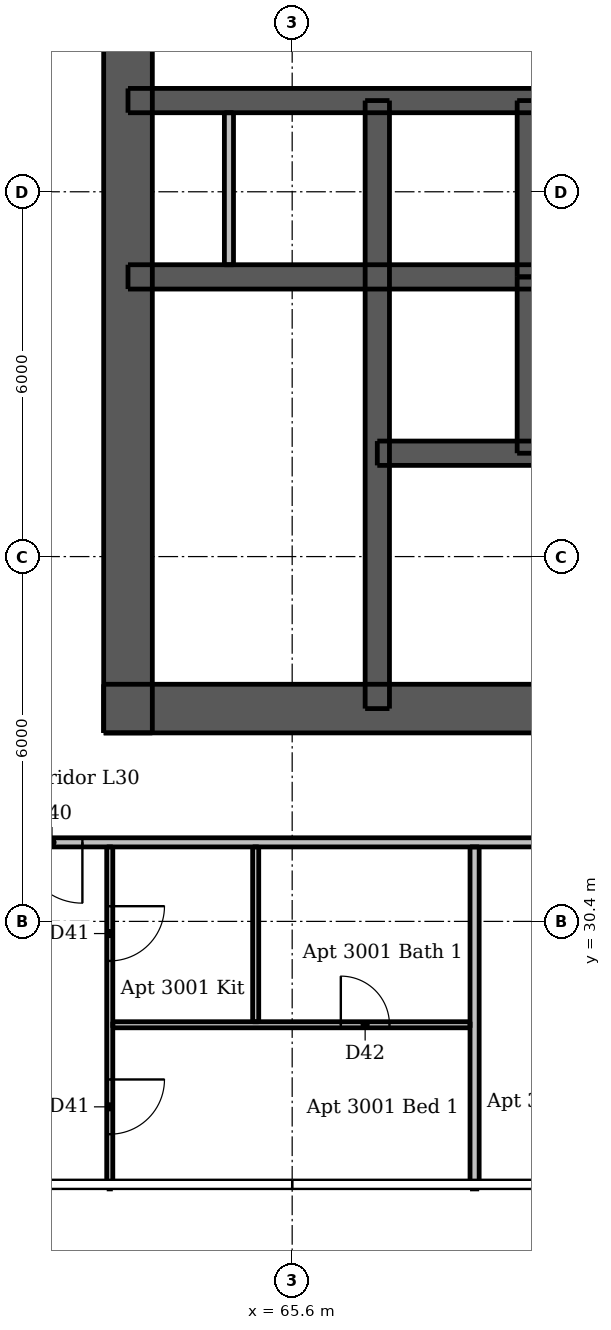
"""IFC4 building model, lengths in metres.
Left out: names, types, materials, properties, quantities, classifications, styles, units other than length and angle.
Written with IfcOpenShell. Run it as: python <this file> out.ifc"""

import sys

from ifc_helpers import new_model, si_unit, direction, frame, frame_2d, origin, place, context, subcontext, project, spatial, rectangle, extrude, element, fill, save


model = new_model("IFC4")
c1 = context("Model", 3, precision=1e-05, world=origin(), true_north=direction((0.0, 1.0)))
c2 = subcontext(c1, "Body", "Model", "MODEL_VIEW")
j1 = project(units=[si_unit("LENGTHUNIT", "METRE"), si_unit("PLANEANGLEUNIT", "RADIAN")], contexts=[c1])
p1 = place(None, origin())
s1 = spatial("IfcSite", under=j1, at=p1, CompositionType="ELEMENT")
p2 = place(p1, origin())
s2 = spatial("IfcBuilding", under=s1, at=p2, CompositionType="ELEMENT")
p3 = place(p2, frame((0.0, 0.0, 111.7)))
s3 = spatial("IfcBuildingStorey", under=s2, at=p3, CompositionType="ELEMENT", Elevation=111.7)
p4 = place(p3, frame((62.5, 33.9, 0.0), z_axis=(0.0, 0.0, 1.0), x_axis=(1.0, 0.0, 0.0)))
e1 = element("IfcWall", 1, at=p4, inside=s3, PredefinedType="SHEAR", context=c2, shape_type="SweptSolid", body=[
    extrude(rectangle(XDim=24.0, YDim=0.8, at=frame_2d((12.0, 0.0))), origin(), (0.0, 0.0, 1.0), 3.05),
])
p5 = place(p4, frame((2.0, 0.0, 0.0)))
e2 = element("IfcOpeningElement", 2, at=p5, cuts=e1, PredefinedType="OPENING", context=c2, shape_type="SweptSolid", body=[
    extrude(rectangle(XDim=1.1, YDim=2.1, at=frame_2d((0.55, 1.05))), frame((0.0, 0.41, 0.0), z_axis=(0.0, -1.0, 0.0), x_axis=(1.0, 0.0, 0.0)), (0.0, 0.0, 1.0), 0.82),
])
p6 = place(p4, frame((20.9, 0.0, 0.0)))
e3 = element("IfcOpeningElement", 3, at=p6, cuts=e1, PredefinedType="OPENING", context=c2, shape_type="SweptSolid", body=[
    extrude(rectangle(XDim=1.1, YDim=2.1, at=frame_2d((0.55, 1.05))), frame((0.0, 0.41, 0.0), z_axis=(0.0, -1.0, 0.0), x_axis=(1.0, 0.0, 0.0)), (0.0, 0.0, 1.0), 0.82),
])
p7 = place(p4, frame((8.0, 0.0, 0.0)))
e4 = element("IfcOpeningElement", 4, at=p7, cuts=e1, PredefinedType="OPENING", context=c2, shape_type="SweptSolid", body=[
    extrude(rectangle(XDim=1.1, YDim=2.1, at=frame_2d((0.55, 1.05))), frame((0.0, 0.41, 0.0), z_axis=(0.0, -1.0, 0.0), x_axis=(1.0, 0.0, 0.0)), (0.0, 0.0, 1.0), 0.82),
])
p8 = place(p4, frame((16.363, 0.0, 0.0)))
e5 = element("IfcOpeningElement", 5, at=p8, cuts=e1, PredefinedType="OPENING", context=c2, shape_type="SweptSolid", body=[
    extrude(rectangle(XDim=0.9, YDim=2.1, at=frame_2d((0.45, 1.05))), frame((0.0, 0.41, 0.0), z_axis=(0.0, -1.0, 0.0), x_axis=(1.0, 0.0, 0.0)), (0.0, 0.0, 1.0), 0.82),
])
p9 = place(p3, frame((62.9, 33.5, 0.0), z_axis=(0.0, 0.0, 1.0), x_axis=(0.0, 1.0, 0.0)))
e6 = element("IfcWall", 6, at=p9, inside=s3, PredefinedType="SHEAR", context=c2, shape_type="SweptSolid", body=[
    extrude(rectangle(XDim=24.0, YDim=0.8, at=frame_2d((12.0, 0.0))), origin(), (0.0, 0.0, 1.0), 3.05),
])
p10 = place(p9, frame((11.2, 0.0, 0.0)))
e7 = element("IfcOpeningElement", 7, at=p10, cuts=e6, PredefinedType="OPENING", context=c2, shape_type="SweptSolid", body=[
    extrude(rectangle(XDim=1.6, YDim=2.1, at=frame_2d((0.8, 1.05))), frame((0.0, 0.41, 0.0), z_axis=(0.0, -1.0, 0.0), x_axis=(1.0, 0.0, 0.0)), (0.0, 0.0, 1.0), 0.82),
])
p11 = place(p3, frame((62.9, 41.0, 0.0), z_axis=(0.0, 0.0, 1.0), x_axis=(1.0, 0.0, 0.0)))
e8 = element("IfcWall", 8, at=p11, inside=s3, PredefinedType="SHEAR", context=c2, shape_type="SweptSolid", body=[
    extrude(rectangle(XDim=23.2, YDim=0.4, at=frame_2d((11.6, 0.0))), origin(), (0.0, 0.0, 1.0), 3.05),
])
p12 = place(p3, frame((62.9, 43.9, 0.0), z_axis=(0.0, 0.0, 1.0), x_axis=(1.0, 0.0, 0.0)))
e9 = element("IfcWall", 9, at=p12, inside=s3, PredefinedType="SHEAR", context=c2, shape_type="SweptSolid", body=[
    extrude(rectangle(XDim=23.2, YDim=0.4, at=frame_2d((11.6, 0.0))), origin(), (0.0, 0.0, 1.0), 3.05),
])
p13 = place(p12, frame((0.63, 0.0, 0.0)))
e10 = element("IfcOpeningElement", 10, at=p13, cuts=e9, PredefinedType="OPENING", context=c2, shape_type="SweptSolid", body=[
    extrude(rectangle(XDim=0.8, YDim=2.1, at=frame_2d((0.4, 1.05))), frame((0.0, 0.21, 0.0), z_axis=(0.0, -1.0, 0.0), x_axis=(1.0, 0.0, 0.0)), (0.0, 0.0, 1.0), 0.42),
])
p14 = place(p12, frame((2.33, 0.0, 0.0)))
e11 = element("IfcOpeningElement", 11, at=p14, cuts=e9, PredefinedType="OPENING", context=c2, shape_type="SweptSolid", body=[
    extrude(rectangle(XDim=0.9, YDim=2.1, at=frame_2d((0.45, 1.05))), frame((0.0, 0.21, 0.0), z_axis=(0.0, -1.0, 0.0), x_axis=(1.0, 0.0, 0.0)), (0.0, 0.0, 1.0), 0.42),
])
p15 = place(p12, frame((20.6, 0.0, 0.0)))
e12 = element("IfcOpeningElement", 12, at=p15, cuts=e9, PredefinedType="OPENING", context=c2, shape_type="SweptSolid", body=[
    extrude(rectangle(XDim=0.9, YDim=2.1, at=frame_2d((0.45, 1.05))), frame((0.0, 0.21, 0.0), z_axis=(0.0, -1.0, 0.0), x_axis=(1.0, 0.0, 0.0)), (0.0, 0.0, 1.0), 0.42),
])
p16 = place(p12, frame((4.8, 0.0, 0.0)))
e13 = element("IfcOpeningElement", 13, at=p16, cuts=e9, PredefinedType="OPENING", context=c2, shape_type="SweptSolid", body=[
    extrude(rectangle(XDim=1.1, YDim=2.1, at=frame_2d((0.55, 1.05))), frame((0.0, 0.21, 0.0), z_axis=(0.0, -1.0, 0.0), x_axis=(1.0, 0.0, 0.0)), (0.0, 0.0, 1.0), 0.42),
])
p17 = place(p12, frame((7.3, 0.0, 0.0)))
e14 = element("IfcOpeningElement", 14, at=p17, cuts=e9, PredefinedType="OPENING", context=c2, shape_type="SweptSolid", body=[
    extrude(rectangle(XDim=1.1, YDim=2.1, at=frame_2d((0.55, 1.05))), frame((0.0, 0.21, 0.0), z_axis=(0.0, -1.0, 0.0), x_axis=(1.0, 0.0, 0.0)), (0.0, 0.0, 1.0), 0.42),
])
p18 = place(p12, frame((9.8, 0.0, 0.0)))
e15 = element("IfcOpeningElement", 15, at=p18, cuts=e9, PredefinedType="OPENING", context=c2, shape_type="SweptSolid", body=[
    extrude(rectangle(XDim=1.1, YDim=2.1, at=frame_2d((0.55, 1.05))), frame((0.0, 0.21, 0.0), z_axis=(0.0, -1.0, 0.0), x_axis=(1.0, 0.0, 0.0)), (0.0, 0.0, 1.0), 0.42),
])
p19 = place(p12, frame((12.3, 0.0, 0.0)))
e16 = element("IfcOpeningElement", 16, at=p19, cuts=e9, PredefinedType="OPENING", context=c2, shape_type="SweptSolid", body=[
    extrude(rectangle(XDim=1.1, YDim=2.1, at=frame_2d((0.55, 1.05))), frame((0.0, 0.21, 0.0), z_axis=(0.0, -1.0, 0.0), x_axis=(1.0, 0.0, 0.0)), (0.0, 0.0, 1.0), 0.42),
])
p20 = place(p12, frame((14.8, 0.0, 0.0)))
e17 = element("IfcOpeningElement", 17, at=p20, cuts=e9, PredefinedType="OPENING", context=c2, shape_type="SweptSolid", body=[
    extrude(rectangle(XDim=1.1, YDim=2.1, at=frame_2d((0.55, 1.05))), frame((0.0, 0.21, 0.0), z_axis=(0.0, -1.0, 0.0), x_axis=(1.0, 0.0, 0.0)), (0.0, 0.0, 1.0), 0.42),
])
p21 = place(p12, frame((17.3, 0.0, 0.0)))
e18 = element("IfcOpeningElement", 18, at=p21, cuts=e9, PredefinedType="OPENING", context=c2, shape_type="SweptSolid", body=[
    extrude(rectangle(XDim=1.1, YDim=2.1, at=frame_2d((0.55, 1.05))), frame((0.0, 0.21, 0.0), z_axis=(0.0, -1.0, 0.0), x_axis=(1.0, 0.0, 0.0)), (0.0, 0.0, 1.0), 0.42),
])
p22 = place(p3, frame((67.0, 33.9, 0.0), z_axis=(0.0, 0.0, 1.0), x_axis=(0.0, 1.0, 0.0)))
e19 = element("IfcWall", 19, at=p22, inside=s3, PredefinedType="SHEAR", context=c2, shape_type="SweptSolid", body=[
    extrude(rectangle(XDim=10.0, YDim=0.4, at=frame_2d((5.0, 0.0))), origin(), (0.0, 0.0, 1.0), 3.05),
])
p23 = place(p22, frame((0.6, 0.0, 0.0)))
e20 = element("IfcOpeningElement", 20, at=p23, cuts=e19, PredefinedType="OPENING", context=c2, shape_type="SweptSolid", body=[
    extrude(rectangle(XDim=1.1, YDim=2.1, at=frame_2d((0.55, 1.05))), frame((0.0, 0.21, 0.0), z_axis=(0.0, -1.0, 0.0), x_axis=(1.0, 0.0, 0.0)), (0.0, 0.0, 1.0), 0.42),
])
p24 = place(p3, frame((69.5, 41.0, 0.0), z_axis=(0.0, 0.0, 1.0), x_axis=(0.0, 1.0, 0.0)))
e21 = element("IfcWall", 21, at=p24, inside=s3, PredefinedType="SHEAR", context=c2, shape_type="SweptSolid", body=[
    extrude(rectangle(XDim=2.9, YDim=0.4, at=frame_2d((1.45, 0.0))), origin(), (0.0, 0.0, 1.0), 3.05),
])
p25 = place(p3, frame((67.0, 38.1, 0.0), z_axis=(0.0, 0.0, 1.0), x_axis=(1.0, 0.0, 0.0)))
e22 = element("IfcWall", 22, at=p25, inside=s3, PredefinedType="SHEAR", context=c2, shape_type="SweptSolid", body=[
    extrude(rectangle(XDim=7.5, YDim=0.4, at=frame_2d((3.75, 0.0))), origin(), (0.0, 0.0, 1.0), 3.05),
])
p26 = place(p25, frame((0.7, 0.0, 0.0)))
e23 = element("IfcOpeningElement", 23, at=p26, cuts=e22, PredefinedType="OPENING", context=c2, shape_type="SweptSolid", body=[
    extrude(rectangle(XDim=1.1, YDim=2.1, at=frame_2d((0.55, 1.05))), frame((0.0, 0.21, 0.0), z_axis=(0.0, -1.0, 0.0), x_axis=(1.0, 0.0, 0.0)), (0.0, 0.0, 1.0), 0.42),
])
p27 = place(p25, frame((3.2, 0.0, 0.0)))
e24 = element("IfcOpeningElement", 24, at=p27, cuts=e22, PredefinedType="OPENING", context=c2, shape_type="SweptSolid", body=[
    extrude(rectangle(XDim=1.1, YDim=2.1, at=frame_2d((0.55, 1.05))), frame((0.0, 0.21, 0.0), z_axis=(0.0, -1.0, 0.0), x_axis=(1.0, 0.0, 0.0)), (0.0, 0.0, 1.0), 0.42),
])
p28 = place(p25, frame((5.65, 0.0, 0.0)))
e25 = element("IfcOpeningElement", 25, at=p28, cuts=e22, PredefinedType="OPENING", context=c2, shape_type="SweptSolid", body=[
    extrude(rectangle(XDim=1.2, YDim=2.1, at=frame_2d((0.6, 1.05))), frame((0.0, 0.21, 0.0), z_axis=(0.0, -1.0, 0.0), x_axis=(1.0, 0.0, 0.0)), (0.0, 0.0, 1.0), 0.42),
])
p29 = place(p3, frame((69.5, 38.1, 0.0), z_axis=(0.0, 0.0, 1.0), x_axis=(0.0, 1.0, 0.0)))
e26 = element("IfcWall", 26, at=p29, inside=s3, PredefinedType="SHEAR", context=c2, shape_type="SweptSolid", body=[
    extrude(rectangle(XDim=2.9, YDim=0.4, at=frame_2d((1.45, 0.0))), origin(), (0.0, 0.0, 1.0), 3.05),
])
p30 = place(p3, frame((64.56, 41.2, 0.0), z_axis=(0.0, 0.0, 1.0), x_axis=(0.0, 1.0, 0.0)))
e27 = element("IfcWall", 27, at=p30, inside=s3, PredefinedType="PLUMBINGWALL", context=c2, shape_type="SweptSolid", body=[
    extrude(rectangle(XDim=2.5, YDim=0.15, at=frame_2d((1.25, 0.0))), origin(), (0.0, 0.0, 1.0), 3.05),
])
p31 = place(p3, frame((62.6, 31.625, 0.0), z_axis=(0.0, 0.0, 1.0), x_axis=(0.0, -1.0, 0.0)))
e28 = element("IfcWall", 28, at=p31, inside=s3, PredefinedType="PARTITIONING", context=c2, shape_type="SweptSolid", body=[
    extrude(rectangle(XDim=5.625, YDim=0.1, at=frame_2d((2.812, 0.0))), origin(), (0.0, 0.0, 1.0), 3.05),
])
p32 = place(p31, frame((0.975, 0.0, 0.0)))
e29 = element("IfcOpeningElement", 29, at=p32, cuts=e28, PredefinedType="OPENING", context=c2, shape_type="SweptSolid", body=[
    extrude(rectangle(XDim=0.9, YDim=2.1, at=frame_2d((0.45, 1.05))), frame((0.0, 0.06, 0.0), z_axis=(0.0, -1.0, 0.0), x_axis=(1.0, 0.0, 0.0)), (0.0, 0.0, 1.0), 0.12),
])
p33 = place(p31, frame((3.825, 0.0, 0.0)))
e30 = element("IfcOpeningElement", 30, at=p33, cuts=e28, PredefinedType="OPENING", context=c2, shape_type="SweptSolid", body=[
    extrude(rectangle(XDim=0.9, YDim=2.1, at=frame_2d((0.45, 1.05))), frame((0.0, 0.06, 0.0), z_axis=(0.0, -1.0, 0.0), x_axis=(1.0, 0.0, 0.0)), (0.0, 0.0, 1.0), 0.12),
])
p34 = place(p3, frame((65.0, 28.75, 0.0), z_axis=(0.0, 0.0, 1.0), x_axis=(0.0, 1.0, 0.0)))
e31 = element("IfcWall", 31, at=p34, inside=s3, PredefinedType="PARTITIONING", context=c2, shape_type="SweptSolid", body=[
    extrude(rectangle(XDim=2.875, YDim=0.1, at=frame_2d((1.438, 0.0))), origin(), (0.0, 0.0, 1.0), 3.05),
])
p35 = place(p3, frame((62.65, 28.7, 0.0), z_axis=(0.0, 0.0, 1.0), x_axis=(1.0, 0.0, 0.0)))
e32 = element("IfcWall", 32, at=p35, inside=s3, PredefinedType="PARTITIONING", context=c2, shape_type="SweptSolid", body=[
    extrude(rectangle(XDim=5.875, YDim=0.1, at=frame_2d((2.938, 0.0))), origin(), (0.0, 0.0, 1.0), 3.05),
])
p36 = place(p35, frame((3.75, 0.0, 0.0)))
e33 = element("IfcOpeningElement", 33, at=p36, cuts=e32, PredefinedType="OPENING", context=c2, shape_type="SweptSolid", body=[
    extrude(rectangle(XDim=0.8, YDim=2.1, at=frame_2d((0.4, 1.05))), frame((0.0, 0.06, 0.0), z_axis=(0.0, -1.0, 0.0), x_axis=(1.0, 0.0, 0.0)), (0.0, 0.0, 1.0), 0.12),
])
p37 = place(p3, frame((68.6, 26.0, 0.0), z_axis=(0.0, 0.0, 1.0), x_axis=(0.0, 1.0, 0.0)))
e34 = element("IfcWall", 34, at=p37, inside=s3, PredefinedType="PARTITIONING", context=c2, shape_type="SweptSolid", body=[
    extrude(rectangle(XDim=5.625, YDim=0.15, at=frame_2d((2.812, 0.0))), origin(), (0.0, 0.0, 1.0), 3.05),
])
p38 = place(p3, frame((89.525, 31.7, 0.0), z_axis=(0.0, 0.0, 1.0), x_axis=(-1.0, 0.0, 0.0)))
e35 = element("IfcWall", 35, at=p38, inside=s3, PredefinedType="PARTITIONING", context=c2, shape_type="SweptSolid", body=[
    extrude(rectangle(XDim=28.75, YDim=0.15, at=frame_2d((14.375, 0.0))), origin(), (0.0, 0.0, 1.0), 3.05),
])
p39 = place(p38, frame((27.375, 0.0, 0.0)))
e36 = element("IfcOpeningElement", 36, at=p39, cuts=e35, PredefinedType="OPENING", context=c2, shape_type="SweptSolid", body=[
    extrude(rectangle(XDim=1.0, YDim=2.1, at=frame_2d((0.5, 1.05))), frame((0.0, 0.085, 0.0), z_axis=(0.0, -1.0, 0.0), x_axis=(1.0, 0.0, 0.0)), (0.0, 0.0, 1.0), 0.17),
])
p40 = place(p38, frame((12.625, 0.0, 0.0)))
e37 = element("IfcOpeningElement", 37, at=p40, cuts=e35, PredefinedType="OPENING", context=c2, shape_type="SweptSolid", body=[
    extrude(rectangle(XDim=1.0, YDim=2.1, at=frame_2d((0.5, 1.05))), frame((0.0, 0.085, 0.0), z_axis=(0.0, -1.0, 0.0), x_axis=(1.0, 0.0, 0.0)), (0.0, 0.0, 1.0), 0.17),
])
p41 = place(p38, frame((2.425, 0.0, 0.0)))
e38 = element("IfcOpeningElement", 38, at=p41, cuts=e35, PredefinedType="OPENING", context=c2, shape_type="SweptSolid", body=[
    extrude(rectangle(XDim=1.0, YDim=2.1, at=frame_2d((0.5, 1.05))), frame((0.0, 0.085, 0.0), z_axis=(0.0, -1.0, 0.0), x_axis=(1.0, 0.0, 0.0)), (0.0, 0.0, 1.0), 0.17),
])
p42 = place(p5, origin())
e39 = element("IfcDoor", 39, at=p42, inside=s3, OperationType="SINGLE_SWING_LEFT", PredefinedType="DOOR", context=c2, shape_type="SweptSolid", body=[
    extrude(rectangle(XDim=1.1, YDim=2.1, at=frame_2d((0.55, 1.05))), frame((0.0, 0.388, 0.0), z_axis=(0.0, -1.0, 0.0), x_axis=(1.0, 0.0, 0.0)), (0.0, 0.0, 1.0), 0.05),
])
fill(e2, e39)
p43 = place(p23, origin())
e40 = element("IfcDoor", 40, at=p43, inside=s3, OperationType="SINGLE_SWING_RIGHT", PredefinedType="DOOR", context=c2, shape_type="SweptSolid", body=[
    extrude(rectangle(XDim=1.1, YDim=2.1, at=frame_2d((0.55, 1.05))), frame((0.0, -0.138, 0.0), z_axis=(0.0, -1.0, 0.0), x_axis=(1.0, 0.0, 0.0)), (0.0, 0.0, 1.0), 0.05),
])
fill(e20, e40)
p44 = place(p13, origin())
e41 = element("IfcDoor", 41, at=p44, inside=s3, OperationType="SINGLE_SWING_LEFT", PredefinedType="DOOR", context=c2, shape_type="SweptSolid", body=[
    extrude(rectangle(XDim=0.8, YDim=2.1, at=frame_2d((0.4, 1.05))), frame((0.0, -0.138, 0.0), z_axis=(0.0, -1.0, 0.0), x_axis=(1.0, 0.0, 0.0)), (0.0, 0.0, 1.0), 0.05),
])
fill(e10, e41)
p45 = place(p14, origin())
e42 = element("IfcDoor", 42, at=p45, inside=s3, OperationType="SINGLE_SWING_RIGHT", PredefinedType="DOOR", context=c2, shape_type="SweptSolid", body=[
    extrude(rectangle(XDim=0.9, YDim=2.1, at=frame_2d((0.45, 1.05))), frame((0.0, -0.138, 0.0), z_axis=(0.0, -1.0, 0.0), x_axis=(1.0, 0.0, 0.0)), (0.0, 0.0, 1.0), 0.05),
])
fill(e11, e42)
p46 = place(p16, origin())
e43 = element("IfcDoor", 43, at=p46, inside=s3, OperationType="DOUBLE_DOOR_SLIDING", PredefinedType="DOOR", context=c2, shape_type="SweptSolid", body=[
    extrude(rectangle(XDim=1.1, YDim=2.1, at=frame_2d((0.55, 1.05))), frame((0.0, 0.025, 0.0), z_axis=(0.0, -1.0, 0.0), x_axis=(1.0, 0.0, 0.0)), (0.0, 0.0, 1.0), 0.05),
])
fill(e13, e43)
p47 = place(p26, origin())
e44 = element("IfcDoor", 44, at=p47, inside=s3, OperationType="DOUBLE_DOOR_SLIDING", PredefinedType="DOOR", context=c2, shape_type="SweptSolid", body=[
    extrude(rectangle(XDim=1.1, YDim=2.1, at=frame_2d((0.55, 1.05))), frame((0.0, 0.025, 0.0), z_axis=(0.0, -1.0, 0.0), x_axis=(1.0, 0.0, 0.0)), (0.0, 0.0, 1.0), 0.05),
])
fill(e23, e44)
p48 = place(p39, origin())
e45 = element("IfcDoor", 45, at=p48, inside=s3, OperationType="SINGLE_SWING_LEFT", PredefinedType="DOOR", context=c2, shape_type="SweptSolid", body=[
    extrude(rectangle(XDim=1.0, YDim=2.1, at=frame_2d((0.5, 1.05))), frame((0.0, 0.025, 0.0), z_axis=(0.0, -1.0, 0.0), x_axis=(1.0, 0.0, 0.0)), (0.0, 0.0, 1.0), 0.05),
])
fill(e36, e45)
p49 = place(p32, origin())
e46 = element("IfcDoor", 46, at=p49, inside=s3, OperationType="SINGLE_SWING_LEFT", PredefinedType="DOOR", context=c2, shape_type="SweptSolid", body=[
    extrude(rectangle(XDim=0.9, YDim=2.1, at=frame_2d((0.45, 1.05))), frame((0.0, 0.025, 0.0), z_axis=(0.0, -1.0, 0.0), x_axis=(1.0, 0.0, 0.0)), (0.0, 0.0, 1.0), 0.05),
])
fill(e29, e46)
p50 = place(p33, origin())
e47 = element("IfcDoor", 47, at=p50, inside=s3, OperationType="SINGLE_SWING_LEFT", PredefinedType="DOOR", context=c2, shape_type="SweptSolid", body=[
    extrude(rectangle(XDim=0.9, YDim=2.1, at=frame_2d((0.45, 1.05))), frame((0.0, 0.025, 0.0), z_axis=(0.0, -1.0, 0.0), x_axis=(1.0, 0.0, 0.0)), (0.0, 0.0, 1.0), 0.05),
])
fill(e30, e47)
p51 = place(p36, origin())
e48 = element("IfcDoor", 48, at=p51, inside=s3, OperationType="SINGLE_SWING_LEFT", PredefinedType="DOOR", context=c2, shape_type="SweptSolid", body=[
    extrude(rectangle(XDim=0.8, YDim=2.1, at=frame_2d((0.4, 1.05))), frame((0.0, 0.025, 0.0), z_axis=(0.0, -1.0, 0.0), x_axis=(1.0, 0.0, 0.0)), (0.0, 0.0, 1.0), 0.05),
])
fill(e33, e48)
save(model, sys.argv[1])
